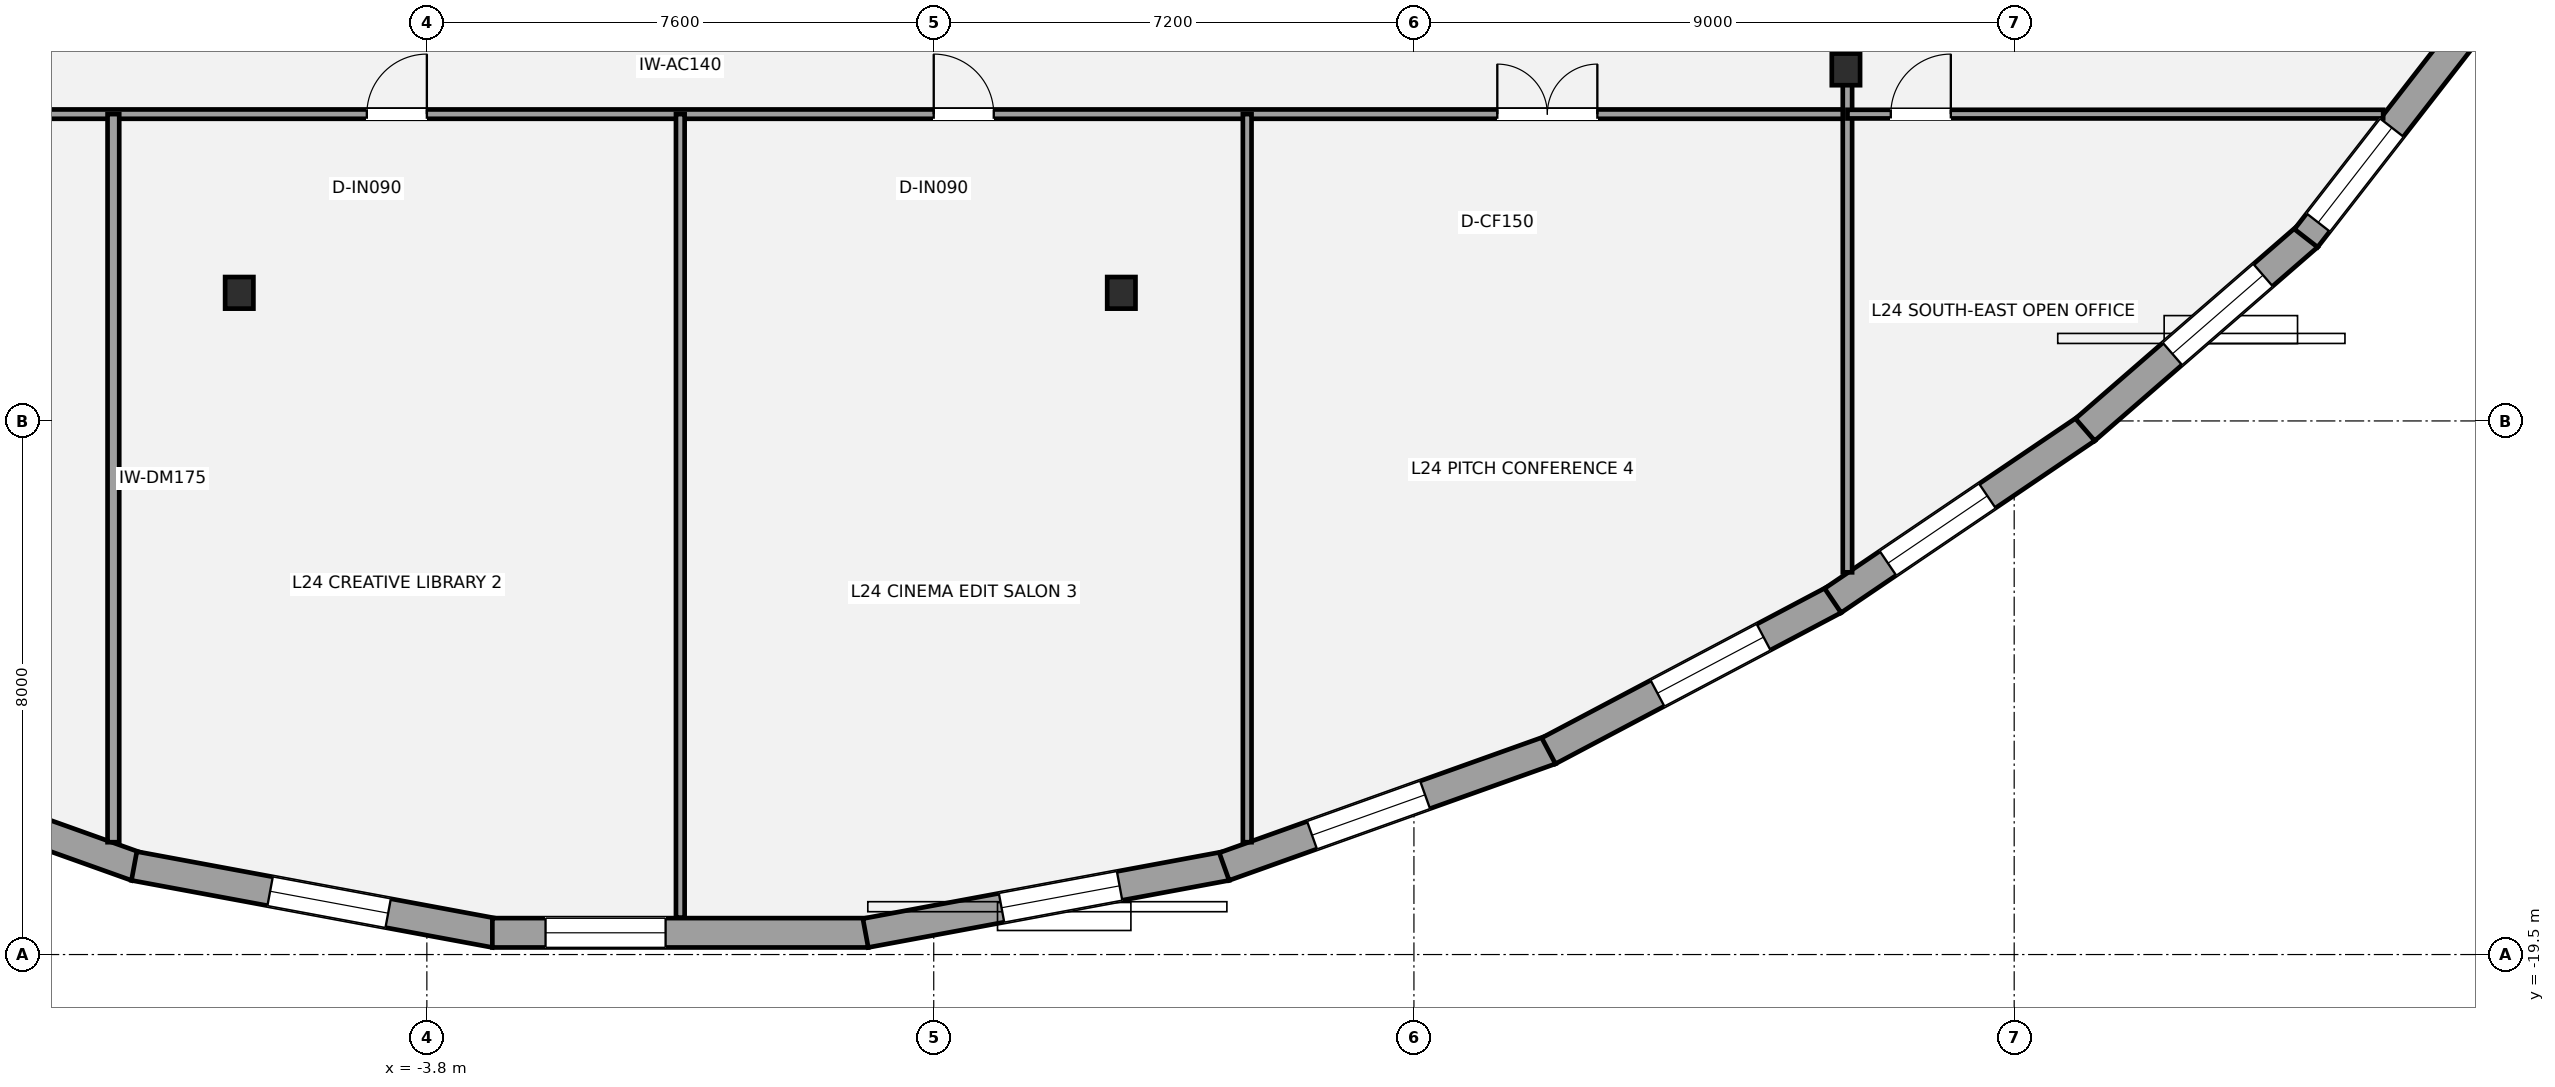
"""IFC4 building model, lengths in metres.
Left out: names, types, materials, properties, quantities, classifications, styles, units other than length and angle.
Written with IfcOpenShell. Run it as: python <this file> out.ifc"""

import sys

from ifc_helpers import new_model, si_unit, direction, frame, frame_2d, origin, origin_2d, place, context, subcontext, project, spatial, rectangle, i_section, extrude, element, fill, save


model = new_model("IFC4")
c1 = context("Model", 3, precision=1e-05, world=origin(), true_north=direction((0.0, 1.0)))
c2 = subcontext(c1, "Body", "Model", "MODEL_VIEW")
j1 = project(units=[si_unit("LENGTHUNIT", "METRE"), si_unit("PLANEANGLEUNIT", "RADIAN")], contexts=[c1])
p1 = place(None, origin())
s1 = spatial("IfcSite", under=j1, at=p1, CompositionType="ELEMENT")
p2 = place(p1, origin())
s2 = spatial("IfcBuilding", under=s1, at=p2, CompositionType="ELEMENT")
p3 = place(p2, frame((0.0, 0.0, 93.1)))
s3 = spatial("IfcBuildingStorey", under=s2, at=p3, CompositionType="ELEMENT", Elevation=93.1)
for number, where, z_axis, x_axis in (
    (1, (-6.613, -9.579, 0.0), (0.0, 0.0, 1.0), (1.0, 0.0, 0.0)),
    (2, (6.613, -9.579, 0.0), (0.0, 0.0, 1.0), (1.0, 0.0, 0.0)),
    (3, (17.477, -6.229, 0.0), (0.0, 0.0, 1.0), (1.0, 0.0, 0.0)),
):
    element("IfcColumn", number, at=place(p3, frame(where, z_axis=z_axis, x_axis=x_axis)), inside=s3, PredefinedType="COLUMN", context=c2, shape_type="SweptSolid", body=[
        extrude(i_section(OverallWidth=0.424, OverallDepth=0.474, WebThickness=0.048, FlangeThickness=0.077, at=origin_2d()), origin(), (0.0, 0.0, 1.0), 3.5),
    ])
p4 = place(p3, frame((-8.155, -18.181, 0.0), z_axis=(0.0, 0.0, 1.0), x_axis=(-0.941734469447, 0.336357234285, 0.0)))
e4 = element("IfcWall", 4, at=p4, inside=s3, PredefinedType="STANDARD", context=c2, shape_type="SweptSolid", body=[
    extrude(rectangle(XDim=5.196, YDim=0.44, at=frame_2d((2.598, 0.0))), origin(), (0.0, 0.0, 1.0), 2.528),
])
p5 = place(p4, frame((1.948, 0.0, 0.65)))
e5 = element("IfcOpeningElement", 5, at=p5, cuts=e4, PredefinedType="OPENING", context=c2, shape_type="SweptSolid", body=[
    extrude(rectangle(XDim=1.8, YDim=1.7, at=frame_2d((0.9, 0.85))), frame((0.0, 0.23, 0.0), z_axis=(0.0, -1.0, 0.0), x_axis=(1.0, 0.0, 0.0)), (0.0, 0.0, 1.0), 0.46),
])
p6 = place(p3, frame((-2.778, -19.177, 0.0), z_axis=(0.0, 0.0, 1.0), x_axis=(-0.983175651308, 0.182662636232, 0.0)))
e6 = element("IfcWall", 6, at=p6, inside=s3, PredefinedType="STANDARD", context=c2, shape_type="SweptSolid", body=[
    extrude(rectangle(XDim=5.504, YDim=0.44, at=frame_2d((2.752, 0.0))), origin(), (0.0, 0.0, 1.0), 2.528),
])
p7 = place(p6, frame((1.63, 0.0, 0.65)))
e7 = element("IfcOpeningElement", 7, at=p7, cuts=e6, PredefinedType="OPENING", context=c2, shape_type="SweptSolid", body=[
    extrude(rectangle(XDim=1.8, YDim=1.7, at=frame_2d((0.9, 0.85))), frame((0.0, 0.23, 0.0), z_axis=(0.0, -1.0, 0.0), x_axis=(1.0, 0.0, 0.0)), (0.0, 0.0, 1.0), 0.46),
])
p8 = place(p3, frame((2.818, -19.174, 0.0), z_axis=(0.0, 0.0, 1.0), x_axis=(-1.0, 0.0, 0.0)))
e8 = element("IfcWall", 8, at=p8, inside=s3, PredefinedType="STANDARD", context=c2, shape_type="SweptSolid", body=[
    extrude(rectangle(XDim=5.636, YDim=0.44, at=frame_2d((2.818, 0.0))), origin(), (0.0, 0.0, 1.0), 2.528),
])
p9 = place(p8, frame((3.038, 0.0, 0.65)))
e9 = element("IfcOpeningElement", 9, at=p9, cuts=e8, PredefinedType="OPENING", context=c2, shape_type="SweptSolid", body=[
    extrude(rectangle(XDim=1.8, YDim=1.7, at=frame_2d((0.9, 0.85))), frame((0.0, 0.23, 0.0), z_axis=(0.0, -1.0, 0.0), x_axis=(1.0, 0.0, 0.0)), (0.0, 0.0, 1.0), 0.46),
])
p10 = place(p3, frame((8.189, -18.172, 0.0), z_axis=(0.0, 0.0, 1.0), x_axis=(-0.983175651308, -0.182662636232, 0.0)))
e10 = element("IfcWall", 10, at=p10, inside=s3, PredefinedType="STANDARD", context=c2, shape_type="SweptSolid", body=[
    extrude(rectangle(XDim=5.504, YDim=0.44, at=frame_2d((2.752, 0.0))), origin(), (0.0, 0.0, 1.0), 2.528),
])
p11 = place(p10, frame((1.63, 0.0, 0.65)))
e11 = element("IfcOpeningElement", 11, at=p11, cuts=e10, PredefinedType="OPENING", context=c2, shape_type="SweptSolid", body=[
    extrude(rectangle(XDim=1.8, YDim=1.7, at=frame_2d((0.9, 0.85))), frame((0.0, 0.23, 0.0), z_axis=(0.0, -1.0, 0.0), x_axis=(1.0, 0.0, 0.0)), (0.0, 0.0, 1.0), 0.46),
])
p12 = place(p3, frame((13.048, -16.434, 0.0), z_axis=(0.0, 0.0, 1.0), x_axis=(-0.941734469447, -0.336357234285, 0.0)))
e12 = element("IfcWall", 12, at=p12, inside=s3, PredefinedType="STANDARD", context=c2, shape_type="SweptSolid", body=[
    extrude(rectangle(XDim=5.196, YDim=0.44, at=frame_2d((2.598, 0.0))), origin(), (0.0, 0.0, 1.0), 2.528),
])
p13 = place(p12, frame((1.997, 0.0, 0.65)))
e13 = element("IfcOpeningElement", 13, at=p13, cuts=e12, PredefinedType="OPENING", context=c2, shape_type="SweptSolid", body=[
    extrude(rectangle(XDim=1.8, YDim=1.7, at=frame_2d((0.9, 0.85))), frame((0.0, 0.23, 0.0), z_axis=(0.0, -1.0, 0.0), x_axis=(1.0, 0.0, 0.0)), (0.0, 0.0, 1.0), 0.46),
])
p14 = place(p3, frame((17.302, -14.181, 0.0), z_axis=(0.0, 0.0, 1.0), x_axis=(-0.88395333318, -0.467575132743, 0.0)))
e14 = element("IfcWall", 14, at=p14, inside=s3, PredefinedType="STANDARD", context=c2, shape_type="SweptSolid", body=[
    extrude(rectangle(XDim=4.845, YDim=0.44, at=frame_2d((2.422, 0.0))), origin(), (0.0, 0.0, 1.0), 2.528),
])
p15 = place(p14, frame((1.198, 0.0, 0.65)))
e15 = element("IfcOpeningElement", 15, at=p15, cuts=e14, PredefinedType="OPENING", context=c2, shape_type="SweptSolid", body=[
    extrude(rectangle(XDim=1.8, YDim=1.7, at=frame_2d((0.9, 0.85))), frame((0.0, 0.23, 0.0), z_axis=(0.0, -1.0, 0.0), x_axis=(1.0, 0.0, 0.0)), (0.0, 0.0, 1.0), 0.46),
])
p16 = place(p3, frame((21.084, -11.615, 0.0), z_axis=(0.0, 0.0, 1.0), x_axis=(-0.827749911298, -0.561097214701, 0.0)))
e16 = element("IfcWall", 16, at=p16, inside=s3, PredefinedType="STANDARD", context=c2, shape_type="SweptSolid", body=[
    extrude(rectangle(XDim=4.594, YDim=0.44, at=frame_2d((2.297, 0.0))), origin(), (0.0, 0.0, 1.0), 2.528),
])
p17 = place(p16, frame((1.796, 0.0, 0.65)))
e17 = element("IfcOpeningElement", 17, at=p17, cuts=e16, PredefinedType="OPENING", context=c2, shape_type="SweptSolid", body=[
    extrude(rectangle(XDim=1.8, YDim=1.7, at=frame_2d((0.9, 0.85))), frame((0.0, 0.23, 0.0), z_axis=(0.0, -1.0, 0.0), x_axis=(1.0, 0.0, 0.0)), (0.0, 0.0, 1.0), 0.46),
])
p18 = place(p3, frame((24.405, -8.729, 0.0), z_axis=(0.0, 0.0, 1.0), x_axis=(-0.754922454992, -0.655814064312, 0.0)))
e18 = element("IfcWall", 18, at=p18, inside=s3, PredefinedType="STANDARD", context=c2, shape_type="SweptSolid", body=[
    extrude(rectangle(XDim=4.427, YDim=0.44, at=frame_2d((2.213, 0.0))), origin(), (0.0, 0.0, 1.0), 2.528),
])
p19 = place(p18, frame((0.893, 0.0, 0.65)))
e19 = element("IfcOpeningElement", 19, at=p19, cuts=e18, PredefinedType="OPENING", context=c2, shape_type="SweptSolid", body=[
    extrude(rectangle(XDim=1.8, YDim=1.7, at=frame_2d((0.9, 0.85))), frame((0.0, 0.23, 0.0), z_axis=(0.0, -1.0, 0.0), x_axis=(1.0, 0.0, 0.0)), (0.0, 0.0, 1.0), 0.46),
])
p20 = place(p3, frame((26.954, -5.443, 0.0), z_axis=(0.0, 0.0, 1.0), x_axis=(-0.61375552181, -0.789496142769, 0.0)))
e20 = element("IfcWall", 20, at=p20, inside=s3, PredefinedType="STANDARD", context=c2, shape_type="SweptSolid", body=[
    extrude(rectangle(XDim=4.201, YDim=0.44, at=frame_2d((2.101, 0.0))), origin(), (0.0, 0.0, 1.0), 2.528),
])
p21 = place(p20, frame((2.103, 0.0, 0.65)))
e21 = element("IfcOpeningElement", 21, at=p21, cuts=e20, PredefinedType="OPENING", context=c2, shape_type="SweptSolid", body=[
    extrude(rectangle(XDim=1.8, YDim=1.7, at=frame_2d((0.9, 0.85))), frame((0.0, 0.23, 0.0), z_axis=(0.0, -1.0, 0.0), x_axis=(1.0, 0.0, 0.0)), (0.0, 0.0, 1.0), 0.46),
])
p22 = place(p3, frame((-15.7, -6.9, 0.0), z_axis=(0.0, 0.0, 1.0), x_axis=(1.0, 0.0, 0.0)))
e22 = element("IfcWall", 22, at=p22, inside=s3, PredefinedType="PARTITIONING", context=c2, shape_type="SweptSolid", body=[
    extrude(rectangle(XDim=33.2, YDim=0.14, at=frame_2d((16.6, 0.0))), origin(), (0.0, 0.0, 1.0), 2.688),
])
p23 = place(p22, frame((3.15, 0.0, 0.0)))
e23 = element("IfcOpeningElement", 23, at=p23, cuts=e22, PredefinedType="OPENING", context=c2, shape_type="SweptSolid", body=[
    extrude(rectangle(XDim=0.9, YDim=2.1, at=frame_2d((0.45, 1.05))), frame((0.0, 0.08, 0.0), z_axis=(0.0, -1.0, 0.0), x_axis=(1.0, 0.0, 0.0)), (0.0, 0.0, 1.0), 0.16),
])
p24 = place(p22, frame((11.0, 0.0, 0.0)))
e24 = element("IfcOpeningElement", 24, at=p24, cuts=e22, PredefinedType="OPENING", context=c2, shape_type="SweptSolid", body=[
    extrude(rectangle(XDim=0.9, YDim=2.1, at=frame_2d((0.45, 1.05))), frame((0.0, 0.08, 0.0), z_axis=(0.0, -1.0, 0.0), x_axis=(1.0, 0.0, 0.0)), (0.0, 0.0, 1.0), 0.16),
])
p25 = place(p22, frame((19.5, 0.0, 0.0)))
e25 = element("IfcOpeningElement", 25, at=p25, cuts=e22, PredefinedType="OPENING", context=c2, shape_type="SweptSolid", body=[
    extrude(rectangle(XDim=0.9, YDim=2.1, at=frame_2d((0.45, 1.05))), frame((0.0, 0.08, 0.0), z_axis=(0.0, -1.0, 0.0), x_axis=(1.0, 0.0, 0.0)), (0.0, 0.0, 1.0), 0.16),
])
p26 = place(p22, frame((27.95, 0.0, 0.0)))
e26 = element("IfcOpeningElement", 26, at=p26, cuts=e22, PredefinedType="OPENING", context=c2, shape_type="SweptSolid", body=[
    extrude(rectangle(XDim=1.5, YDim=2.15, at=frame_2d((0.75, 1.075))), frame((0.0, 0.08, 0.0), z_axis=(0.0, -1.0, 0.0), x_axis=(1.0, 0.0, 0.0)), (0.0, 0.0, 1.0), 0.16),
])
p27 = place(p3, frame((17.5, -13.77, 0.0), z_axis=(0.0, 0.0, 1.0), x_axis=(0.0, 1.0, 0.0)))
e27 = element("IfcWall", 27, at=p27, inside=s3, PredefinedType="PARTITIONING", context=c2, shape_type="SweptSolid", body=[
    extrude(rectangle(XDim=21.32, YDim=0.14, at=frame_2d((10.66, 0.0))), origin(), (0.0, 0.0, 1.0), 2.688),
])
p28 = place(p27, frame((10.969, 0.0, 0.0)))
e28 = element("IfcOpeningElement", 28, at=p28, cuts=e27, PredefinedType="OPENING", context=c2, shape_type="SweptSolid", body=[
    extrude(rectangle(XDim=0.9, YDim=2.1, at=frame_2d((0.45, 1.05))), frame((0.0, 0.08, 0.0), z_axis=(0.0, -1.0, 0.0), x_axis=(1.0, 0.0, 0.0)), (0.0, 0.0, 1.0), 0.16),
])
p29 = place(p27, frame((18.195, 0.0, 0.0)))
e29 = element("IfcOpeningElement", 29, at=p29, cuts=e27, PredefinedType="OPENING", context=c2, shape_type="SweptSolid", body=[
    extrude(rectangle(XDim=0.9, YDim=2.1, at=frame_2d((0.45, 1.05))), frame((0.0, 0.08, 0.0), z_axis=(0.0, -1.0, 0.0), x_axis=(1.0, 0.0, 0.0)), (0.0, 0.0, 1.0), 0.16),
])
p30 = place(p3, frame((-8.5, -17.816, 0.0), z_axis=(0.0, 0.0, 1.0), x_axis=(0.0, 1.0, 0.0)))
e30 = element("IfcWall", 30, at=p30, inside=s3, PredefinedType="PARTITIONING", context=c2, shape_type="SweptSolid", body=[
    extrude(rectangle(XDim=10.916, YDim=0.175, at=frame_2d((5.458, 0.0))), origin(), (0.0, 0.0, 1.0), 2.763),
])
p31 = place(p3, frame((0.0, -18.946, 0.0), z_axis=(0.0, 0.0, 1.0), x_axis=(0.0, 1.0, 0.0)))
e31 = element("IfcWall", 31, at=p31, inside=s3, PredefinedType="PARTITIONING", context=c2, shape_type="SweptSolid", body=[
    extrude(rectangle(XDim=12.046, YDim=0.13, at=frame_2d((6.023, 0.0))), origin(), (0.0, 0.0, 1.0), 2.763),
])
p32 = place(p3, frame((8.5, -17.816, 0.0), z_axis=(0.0, 0.0, 1.0), x_axis=(0.0, 1.0, 0.0)))
e32 = element("IfcWall", 32, at=p32, inside=s3, PredefinedType="PARTITIONING", context=c2, shape_type="SweptSolid", body=[
    extrude(rectangle(XDim=10.916, YDim=0.13, at=frame_2d((5.458, 0.0))), origin(), (0.0, 0.0, 1.0), 3.31),
])
p33 = place(p3, frame((17.5, -6.9, 0.0), z_axis=(0.0, 0.0, 1.0), x_axis=(1.0, 0.0, 0.0)))
e33 = element("IfcWall", 33, at=p33, inside=s3, PredefinedType="PARTITIONING", context=c2, shape_type="SweptSolid", body=[
    extrude(rectangle(XDim=8.033, YDim=0.13, at=frame_2d((4.016, 0.0))), origin(), (0.0, 0.0, 1.0), 3.31),
])
p34 = place(p33, frame((0.65, 0.0, 0.0)))
e34 = element("IfcOpeningElement", 34, at=p34, cuts=e33, PredefinedType="OPENING", context=c2, shape_type="SweptSolid", body=[
    extrude(rectangle(XDim=0.9, YDim=2.1, at=frame_2d((0.45, 1.05))), frame((0.0, 0.075, 0.0), z_axis=(0.0, -1.0, 0.0), x_axis=(1.0, 0.0, 0.0)), (0.0, 0.0, 1.0), 0.15),
])
p35 = place(p7, origin())
e35 = element("IfcWindow", 35, at=p35, inside=s3, PartitioningType="SINGLE_PANEL", PredefinedType="WINDOW", context=c2, shape_type="SweptSolid", body=[
    extrude(rectangle(XDim=1.8, YDim=1.7, at=frame_2d((0.9, 0.85))), frame((0.0, -0.01, 0.0), z_axis=(0.0, -1.0, 0.0), x_axis=(1.0, 0.0, 0.0)), (0.0, 0.0, 1.0), 0.06),
])
fill(e7, e35)
p36 = place(p9, origin())
e36 = element("IfcWindow", 36, at=p36, inside=s3, PartitioningType="SINGLE_PANEL", PredefinedType="WINDOW", context=c2, shape_type="SweptSolid", body=[
    extrude(rectangle(XDim=1.8, YDim=1.7, at=frame_2d((0.9, 0.85))), frame((0.0, -0.01, 0.0), z_axis=(0.0, -1.0, 0.0), x_axis=(1.0, 0.0, 0.0)), (0.0, 0.0, 1.0), 0.06),
])
fill(e9, e36)
p37 = place(p11, origin())
e37 = element("IfcWindow", 37, at=p37, inside=s3, PartitioningType="SINGLE_PANEL", PredefinedType="WINDOW", context=c2, shape_type="SweptSolid", body=[
    extrude(rectangle(XDim=1.8, YDim=1.7, at=frame_2d((0.9, 0.85))), frame((0.0, -0.01, 0.0), z_axis=(0.0, -1.0, 0.0), x_axis=(1.0, 0.0, 0.0)), (0.0, 0.0, 1.0), 0.06),
])
fill(e11, e37)
p38 = place(p13, origin())
e38 = element("IfcWindow", 38, at=p38, inside=s3, PartitioningType="SINGLE_PANEL", PredefinedType="WINDOW", context=c2, shape_type="SweptSolid", body=[
    extrude(rectangle(XDim=1.8, YDim=1.7, at=frame_2d((0.9, 0.85))), frame((0.0, -0.01, 0.0), z_axis=(0.0, -1.0, 0.0), x_axis=(1.0, 0.0, 0.0)), (0.0, 0.0, 1.0), 0.06),
])
fill(e13, e38)
p39 = place(p15, origin())
e39 = element("IfcWindow", 39, at=p39, inside=s3, PartitioningType="SINGLE_PANEL", PredefinedType="WINDOW", context=c2, shape_type="SweptSolid", body=[
    extrude(rectangle(XDim=1.8, YDim=1.7, at=frame_2d((0.9, 0.85))), frame((0.0, -0.01, 0.0), z_axis=(0.0, -1.0, 0.0), x_axis=(1.0, 0.0, 0.0)), (0.0, 0.0, 1.0), 0.06),
])
fill(e15, e39)
p40 = place(p17, origin())
e40 = element("IfcWindow", 40, at=p40, inside=s3, PartitioningType="SINGLE_PANEL", PredefinedType="WINDOW", context=c2, shape_type="SweptSolid", body=[
    extrude(rectangle(XDim=1.8, YDim=1.7, at=frame_2d((0.9, 0.85))), frame((0.0, -0.01, 0.0), z_axis=(0.0, -1.0, 0.0), x_axis=(1.0, 0.0, 0.0)), (0.0, 0.0, 1.0), 0.06),
])
fill(e17, e40)
p41 = place(p19, origin())
e41 = element("IfcWindow", 41, at=p41, inside=s3, PartitioningType="SINGLE_PANEL", PredefinedType="WINDOW", context=c2, shape_type="SweptSolid", body=[
    extrude(rectangle(XDim=1.8, YDim=1.7, at=frame_2d((0.9, 0.85))), frame((0.0, -0.01, 0.0), z_axis=(0.0, -1.0, 0.0), x_axis=(1.0, 0.0, 0.0)), (0.0, 0.0, 1.0), 0.06),
])
fill(e19, e41)
p42 = place(p21, origin())
e42 = element("IfcWindow", 42, at=p42, inside=s3, PartitioningType="SINGLE_PANEL", PredefinedType="WINDOW", context=c2, shape_type="SweptSolid", body=[
    extrude(rectangle(XDim=1.8, YDim=1.7, at=frame_2d((0.9, 0.85))), frame((0.0, -0.01, 0.0), z_axis=(0.0, -1.0, 0.0), x_axis=(1.0, 0.0, 0.0)), (0.0, 0.0, 1.0), 0.06),
])
fill(e21, e42)
p43 = place(p24, origin())
e43 = element("IfcDoor", 43, at=p43, inside=s3, OperationType="SINGLE_SWING_RIGHT", PredefinedType="DOOR", context=c2, shape_type="SweptSolid", body=[
    extrude(rectangle(XDim=0.9, YDim=2.1, at=frame_2d((0.45, 1.05))), frame((0.0, 0.025, 0.0), z_axis=(0.0, -1.0, 0.0), x_axis=(1.0, 0.0, 0.0)), (0.0, 0.0, 1.0), 0.05),
])
fill(e24, e43)
p44 = place(p25, origin())
e44 = element("IfcDoor", 44, at=p44, inside=s3, OperationType="SINGLE_SWING_LEFT", PredefinedType="DOOR", context=c2, shape_type="SweptSolid", body=[
    extrude(rectangle(XDim=0.9, YDim=2.1, at=frame_2d((0.45, 1.05))), frame((0.0, 0.025, 0.0), z_axis=(0.0, -1.0, 0.0), x_axis=(1.0, 0.0, 0.0)), (0.0, 0.0, 1.0), 0.05),
])
fill(e25, e44)
p45 = place(p26, origin())
e45 = element("IfcDoor", 45, at=p45, inside=s3, OperationType="DOUBLE_DOOR_SINGLE_SWING", PredefinedType="DOOR", context=c2, shape_type="SweptSolid", body=[
    extrude(rectangle(XDim=1.5, YDim=2.15, at=frame_2d((0.75, 1.075))), frame((0.0, 0.025, 0.0), z_axis=(0.0, -1.0, 0.0), x_axis=(1.0, 0.0, 0.0)), (0.0, 0.0, 1.0), 0.05),
])
fill(e26, e45)
p46 = place(p34, origin())
e46 = element("IfcDoor", 46, at=p46, inside=s3, OperationType="SINGLE_SWING_RIGHT", PredefinedType="DOOR", context=c2, shape_type="SweptSolid", body=[
    extrude(rectangle(XDim=0.9, YDim=2.1, at=frame_2d((0.45, 1.05))), frame((0.0, 0.025, 0.0), z_axis=(0.0, -1.0, 0.0), x_axis=(1.0, 0.0, 0.0)), (0.0, 0.0, 1.0), 0.05),
])
fill(e34, e46)
save(model, sys.argv[1])
